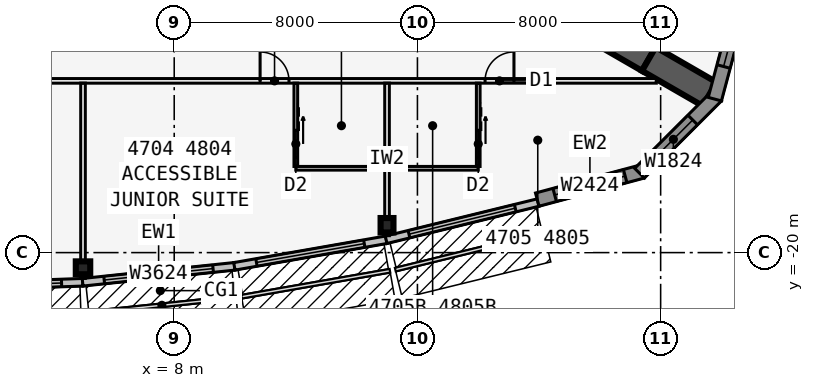
"""IFC4 building model, lengths in metres.
Left out: names, types, materials, properties, quantities, classifications, styles, units other than length and angle.
Written with IfcOpenShell. Run it as: python <this file> out.ifc"""

import sys

from ifc_helpers import new_model, si_unit, direction, frame, frame_2d, origin, origin_2d, place, context, subcontext, project, spatial, polyline, rectangle, i_section, outline, extrude, element, fill, save


model = new_model("IFC4")
c1 = context("Model", 3, precision=1e-05, world=origin(), true_north=direction((0.0, 1.0)))
c2 = subcontext(c1, "Body", "Model", "MODEL_VIEW")
j1 = project(units=[si_unit("LENGTHUNIT", "METRE"), si_unit("PLANEANGLEUNIT", "RADIAN")], contexts=[c1])
p1 = place(None, origin())
s1 = spatial("IfcSite", under=j1, at=p1, CompositionType="ELEMENT")
p2 = place(p1, origin())
s2 = spatial("IfcBuilding", under=s1, at=p2, CompositionType="ELEMENT")
p3 = place(p2, frame((0.0, 0.0, 175.9)))
s3 = spatial("IfcBuildingStorey", under=s2, at=p3, CompositionType="ELEMENT", Elevation=175.9)
for number, where, z_axis, x_axis in (
    (1, (21.61, -12.477, 0.0), (0.0, 0.0, 1.0), (0.866, -0.5, 0.0)),
    (2, (23.61, -13.631, 0.0), (0.0, 0.0, 1.0), (0.866, -0.5, 0.0)),
):
    element("IfcWall", number, at=place(p3, frame(where, z_axis=z_axis, x_axis=x_axis)), inside=s3, PredefinedType="SHEAR", context=c2, shape_type="SweptSolid", body=[
        extrude(rectangle(XDim=2.309, YDim=0.9, at=frame_2d((1.155, 0.0))), origin(), (0.0, 0.0, 1.0), 3.4),
    ])
for number, where, z_axis, x_axis in (
    (3, (5.0, -20.5, 0.0), (0.0, 0.0, 1.0), (0.0, -1.0, 0.0)),
    (4, (15.0, -19.1, 0.0), (0.0, 0.0, 1.0), (1.0, 0.0, 0.0)),
):
    element("IfcColumn", number, at=place(p3, frame(where, z_axis=z_axis, x_axis=x_axis)), inside=s3, PredefinedType="COLUMN", context=c2, shape_type="SweptSolid", body=[
        extrude(i_section(OverallWidth=0.424, OverallDepth=0.475, WebThickness=0.048, FlangeThickness=0.077, at=origin_2d()), origin(), (0.0, 0.0, 1.0), 3.4),
    ])
p4 = place(p3, frame((-0.004, -21.15, 0.0), z_axis=(0.0, 0.0, 1.0), x_axis=(0.999387720943, 0.034988329879, 0.0)))
e5 = element("IfcWall", 5, at=p4, inside=s3, PredefinedType="STANDARD", context=c2, shape_type="SweptSolid", body=[
    extrude(rectangle(XDim=5.003, YDim=0.25, at=frame_2d((2.501, 0.0))), origin(), (0.0, 0.0, 1.0), 3.235),
])
p5 = place(p4, frame((0.701, 0.0, 0.45)))
e6 = element("IfcOpeningElement", 6, at=p5, cuts=e5, PredefinedType="OPENING", context=c2, shape_type="SweptSolid", body=[
    extrude(rectangle(XDim=3.6, YDim=2.4, at=frame_2d((1.8, 1.2))), frame((0.0, 0.135, 0.0), z_axis=(0.0, -1.0, 0.0), x_axis=(1.0, 0.0, 0.0)), (0.0, 0.0, 1.0), 0.27),
])
p6 = place(p3, frame((4.987, -20.976, 0.0), z_axis=(0.0, 0.0, 1.0), x_axis=(0.994534683851, 0.104406717299, 0.0)))
e7 = element("IfcWall", 7, at=p6, inside=s3, PredefinedType="STANDARD", context=c2, shape_type="SweptSolid", body=[
    extrude(rectangle(XDim=5.028, YDim=0.25, at=frame_2d((2.514, 0.0))), origin(), (0.0, 0.0, 1.0), 3.235),
])
p7 = place(p6, frame((0.714, 0.0, 0.45)))
e8 = element("IfcOpeningElement", 8, at=p7, cuts=e7, PredefinedType="OPENING", context=c2, shape_type="SweptSolid", body=[
    extrude(rectangle(XDim=3.6, YDim=2.4, at=frame_2d((1.8, 1.2))), frame((0.0, 0.135, 0.0), z_axis=(0.0, -1.0, 0.0), x_axis=(1.0, 0.0, 0.0)), (0.0, 0.0, 1.0), 0.27),
])
p8 = place(p3, frame((9.979, -20.452, 0.0), z_axis=(0.0, 0.0, 1.0), x_axis=(0.985030467156, 0.172380331752, 0.0)))
e9 = element("IfcWall", 9, at=p8, inside=s3, PredefinedType="STANDARD", context=c2, shape_type="SweptSolid", body=[
    extrude(rectangle(XDim=5.076, YDim=0.25, at=frame_2d((2.538, 0.0))), origin(), (0.0, 0.0, 1.0), 3.235),
])
p9 = place(p8, frame((0.738, 0.0, 0.45)))
e10 = element("IfcOpeningElement", 10, at=p9, cuts=e9, PredefinedType="OPENING", context=c2, shape_type="SweptSolid", body=[
    extrude(rectangle(XDim=3.6, YDim=2.4, at=frame_2d((1.8, 1.2))), frame((0.0, 0.135, 0.0), z_axis=(0.0, -1.0, 0.0), x_axis=(1.0, 0.0, 0.0)), (0.0, 0.0, 1.0), 0.27),
])
p10 = place(p3, frame((14.97, -19.579, 0.0), z_axis=(0.0, 0.0, 1.0), x_axis=(0.971270024053, 0.237980126011, 0.0)))
e11 = element("IfcWall", 11, at=p10, inside=s3, PredefinedType="STANDARD", context=c2, shape_type="SweptSolid", body=[
    extrude(rectangle(XDim=5.148, YDim=0.25, at=frame_2d((2.574, 0.0))), origin(), (0.0, 0.0, 1.0), 3.235),
])
p11 = place(p10, frame((0.774, 0.0, 0.45)))
e12 = element("IfcOpeningElement", 12, at=p11, cuts=e11, PredefinedType="OPENING", context=c2, shape_type="SweptSolid", body=[
    extrude(rectangle(XDim=3.6, YDim=2.4, at=frame_2d((1.8, 1.2))), frame((0.0, 0.135, 0.0), z_axis=(0.0, -1.0, 0.0), x_axis=(1.0, 0.0, 0.0)), (0.0, 0.0, 1.0), 0.27),
])
p12 = place(p3, frame((19.942, -18.258, 0.0), z_axis=(0.0, 0.0, 1.0), x_axis=(0.965924653531, 0.258823421857, 0.0)))
e13 = element("IfcWall", 13, at=p12, inside=s3, PredefinedType="SOLIDWALL", context=c2, shape_type="SweptSolid", body=[
    extrude(rectangle(XDim=3.586, YDim=0.45, at=frame_2d((1.793, 0.0))), origin(), (0.0, 0.0, 1.0), 3.235),
])
p13 = place(p12, frame((0.593, 0.0, 0.45)))
e14 = element("IfcOpeningElement", 14, at=p13, cuts=e13, PredefinedType="OPENING", context=c2, shape_type="SweptSolid", body=[
    extrude(rectangle(XDim=2.4, YDim=2.4, at=frame_2d((1.2, 1.2))), frame((0.0, 0.235, 0.0), z_axis=(0.0, -1.0, 0.0), x_axis=(1.0, 0.0, 0.0)), (0.0, 0.0, 1.0), 0.47),
])
p14 = place(p3, frame((23.305, -17.388, 0.0), z_axis=(0.0, 0.0, 1.0), x_axis=(0.707106781187, 0.707106781187, 0.0)))
e15 = element("IfcWall", 15, at=p14, inside=s3, PredefinedType="SOLIDWALL", context=c2, shape_type="SweptSolid", body=[
    extrude(outline(polyline([(3.586, 0.225), (3.527, 0.225), (3.035, 0.093), (3.0, 0.225), (0.0, 0.225), (0.0, -0.225), (3.586, -0.225), (3.586, 0.225)])), origin(), (0.0, 0.0, 1.0), 3.235),
])
p15 = place(p14, frame((0.675, 0.0, 0.45)))
e16 = element("IfcOpeningElement", 16, at=p15, cuts=e15, PredefinedType="OPENING", context=c2, shape_type="SweptSolid", body=[
    extrude(rectangle(XDim=1.8, YDim=2.4, at=frame_2d((0.9, 1.2))), frame((0.0, 0.235, 0.0), z_axis=(0.0, -1.0, 0.0), x_axis=(1.0, 0.0, 0.0)), (0.0, 0.0, 1.0), 0.47),
])
p16 = place(p3, frame((25.783, -14.953, 0.0), z_axis=(0.0, 0.0, 1.0), x_axis=(0.258823421857, 0.965924653531, 0.0)))
e17 = element("IfcWall", 17, at=p16, inside=s3, PredefinedType="SOLIDWALL", context=c2, shape_type="SweptSolid", body=[
    extrude(outline(polyline([(3.586, 0.225), (0.586, 0.225), (0.551, 0.093), (0.06, 0.225), (0.0, 0.225), (0.0, -0.225), (3.586, -0.225), (3.586, 0.225)])), origin(), (0.0, 0.0, 1.0), 3.235),
])
p17 = place(p16, frame((1.111, 0.0, 0.45)))
e18 = element("IfcOpeningElement", 18, at=p17, cuts=e17, PredefinedType="OPENING", context=c2, shape_type="SweptSolid", body=[
    extrude(rectangle(XDim=1.8, YDim=2.4, at=frame_2d((0.9, 1.2))), frame((0.0, 0.235, 0.0), z_axis=(0.0, -1.0, 0.0), x_axis=(1.0, 0.0, 0.0)), (0.0, 0.0, 1.0), 0.47),
])
p18 = place(p3, frame((-23.857, -14.351, 0.0), z_axis=(0.0, 0.0, 1.0), x_axis=(1.0, 0.0, 0.0)))
e19 = element("IfcWall", 19, at=p18, inside=s3, PredefinedType="PARTITIONING", context=c2, shape_type="SweptSolid", body=[
    extrude(rectangle(XDim=47.714, YDim=0.15, at=frame_2d((23.857, 0.0))), origin(), (0.0, 0.0, 1.0), 3.235),
])
p19 = place(p18, frame((4.682, 0.0, 0.0)))
e20 = element("IfcOpeningElement", 20, at=p19, cuts=e19, PredefinedType="OPENING", context=c2, shape_type="SweptSolid", body=[
    extrude(rectangle(XDim=0.95, YDim=2.13, at=frame_2d((0.475, 1.065))), frame((0.0, 0.085, 0.0), z_axis=(0.0, -1.0, 0.0), x_axis=(1.0, 0.0, 0.0)), (0.0, 0.0, 1.0), 0.17),
])
p20 = place(p18, frame((10.282, 0.0, 0.0)))
e21 = element("IfcOpeningElement", 21, at=p20, cuts=e19, PredefinedType="OPENING", context=c2, shape_type="SweptSolid", body=[
    extrude(rectangle(XDim=0.95, YDim=2.13, at=frame_2d((0.475, 1.065))), frame((0.0, 0.085, 0.0), z_axis=(0.0, -1.0, 0.0), x_axis=(1.0, 0.0, 0.0)), (0.0, 0.0, 1.0), 0.17),
])
p21 = place(p18, frame((17.082, 0.0, 0.0)))
e22 = element("IfcOpeningElement", 22, at=p21, cuts=e19, PredefinedType="OPENING", context=c2, shape_type="SweptSolid", body=[
    extrude(rectangle(XDim=0.95, YDim=2.13, at=frame_2d((0.475, 1.065))), frame((0.0, 0.085, 0.0), z_axis=(0.0, -1.0, 0.0), x_axis=(1.0, 0.0, 0.0)), (0.0, 0.0, 1.0), 0.17),
])
p22 = place(p18, frame((25.857, 0.0, 0.0)))
e23 = element("IfcOpeningElement", 23, at=p22, cuts=e19, PredefinedType="OPENING", context=c2, shape_type="SweptSolid", body=[
    extrude(rectangle(XDim=1.0, YDim=2.13, at=frame_2d((0.5, 1.065))), frame((0.0, 0.085, 0.0), z_axis=(0.0, -1.0, 0.0), x_axis=(1.0, 0.0, 0.0)), (0.0, 0.0, 1.0), 0.17),
])
p23 = place(p18, frame((34.682, 0.0, 0.0)))
e24 = element("IfcOpeningElement", 24, at=p23, cuts=e19, PredefinedType="OPENING", context=c2, shape_type="SweptSolid", body=[
    extrude(rectangle(XDim=0.95, YDim=2.13, at=frame_2d((0.475, 1.065))), frame((0.0, 0.085, 0.0), z_axis=(0.0, -1.0, 0.0), x_axis=(1.0, 0.0, 0.0)), (0.0, 0.0, 1.0), 0.17),
])
p24 = place(p18, frame((42.082, 0.0, 0.0)))
e25 = element("IfcOpeningElement", 25, at=p24, cuts=e19, PredefinedType="OPENING", context=c2, shape_type="SweptSolid", body=[
    extrude(rectangle(XDim=0.95, YDim=2.13, at=frame_2d((0.475, 1.065))), frame((0.0, 0.085, 0.0), z_axis=(0.0, -1.0, 0.0), x_axis=(1.0, 0.0, 0.0)), (0.0, 0.0, 1.0), 0.17),
])
p25 = place(p3, frame((5.0, -14.426, 0.0), z_axis=(0.0, 0.0, 1.0), x_axis=(0.0, -1.0, 0.0)))
e26 = element("IfcWall", 26, at=p25, inside=s3, PredefinedType="PARTITIONING", context=c2, shape_type="SweptSolid", body=[
    extrude(rectangle(XDim=6.423, YDim=0.15, at=frame_2d((3.211, 0.0))), origin(), (0.0, 0.0, 1.0), 2.389),
])
p26 = place(p3, frame((15.0, -14.426, 0.0), z_axis=(0.0, 0.0, 1.0), x_axis=(0.0, -1.0, 0.0)))
e27 = element("IfcWall", 27, at=p26, inside=s3, PredefinedType="PARTITIONING", context=c2, shape_type="SweptSolid", body=[
    extrude(rectangle(XDim=5.017, YDim=0.15, at=frame_2d((2.508, 0.0))), origin(), (0.0, 0.0, 1.0), 2.389),
])
p27 = place(p3, frame((12.0, -17.226, 0.0), z_axis=(0.0, 0.0, 1.0), x_axis=(1.0, 0.0, 0.0)))
e28 = element("IfcWall", 28, at=p27, inside=s3, PredefinedType="PLUMBINGWALL", context=c2, shape_type="SweptSolid", body=[
    extrude(rectangle(XDim=3.0, YDim=0.12, at=frame_2d((1.5, 0.0))), origin(), (0.0, 0.0, 1.0), 3.235),
])
p28 = place(p3, frame((12.0, -14.426, 0.0), z_axis=(0.0, 0.0, 1.0), x_axis=(0.0, -1.0, 0.0)))
e29 = element("IfcWall", 29, at=p28, inside=s3, PredefinedType="PLUMBINGWALL", context=c2, shape_type="SweptSolid", body=[
    extrude(rectangle(XDim=2.74, YDim=0.12, at=frame_2d((1.37, 0.0))), origin(), (0.0, 0.0, 1.0), 3.235),
])
p29 = place(p28, frame((1.55, 0.0, 0.0)))
e30 = element("IfcOpeningElement", 30, at=p29, cuts=e29, PredefinedType="OPENING", context=c2, shape_type="SweptSolid", body=[
    extrude(rectangle(XDim=0.9, YDim=2.13, at=frame_2d((0.45, 1.065))), frame((0.0, 0.07, 0.0), z_axis=(0.0, -1.0, 0.0), x_axis=(1.0, 0.0, 0.0)), (0.0, 0.0, 1.0), 0.14),
])
p30 = place(p3, frame((15.0, -17.226, 0.0), z_axis=(0.0, 0.0, 1.0), x_axis=(1.0, 0.0, 0.0)))
e31 = element("IfcWall", 31, at=p30, inside=s3, PredefinedType="PLUMBINGWALL", context=c2, shape_type="SweptSolid", body=[
    extrude(rectangle(XDim=3.0, YDim=0.12, at=frame_2d((1.5, 0.0))), origin(), (0.0, 0.0, 1.0), 3.235),
])
p31 = place(p3, frame((18.0, -14.426, 0.0), z_axis=(0.0, 0.0, 1.0), x_axis=(0.0, -1.0, 0.0)))
e32 = element("IfcWall", 32, at=p31, inside=s3, PredefinedType="PLUMBINGWALL", context=c2, shape_type="SweptSolid", body=[
    extrude(rectangle(XDim=2.74, YDim=0.12, at=frame_2d((1.37, 0.0))), origin(), (0.0, 0.0, 1.0), 3.235),
])
p32 = place(p31, frame((1.55, 0.0, 0.0)))
e33 = element("IfcOpeningElement", 33, at=p32, cuts=e32, PredefinedType="OPENING", context=c2, shape_type="SweptSolid", body=[
    extrude(rectangle(XDim=0.9, YDim=2.13, at=frame_2d((0.45, 1.065))), frame((0.0, 0.07, 0.0), z_axis=(0.0, -1.0, 0.0), x_axis=(1.0, 0.0, 0.0)), (0.0, 0.0, 1.0), 0.14),
])
p33 = place(p5, origin())
e34 = element("IfcWindow", 34, at=p33, inside=s3, PartitioningType="SINGLE_PANEL", PredefinedType="WINDOW", context=c2, shape_type="SweptSolid", body=[
    extrude(rectangle(XDim=3.6, YDim=2.4, at=frame_2d((1.8, 1.2))), frame((0.0, 0.03, 0.0), z_axis=(0.0, -1.0, 0.0), x_axis=(1.0, 0.0, 0.0)), (0.0, 0.0, 1.0), 0.06),
])
fill(e6, e34)
p34 = place(p7, origin())
e35 = element("IfcWindow", 35, at=p34, inside=s3, PartitioningType="SINGLE_PANEL", PredefinedType="WINDOW", context=c2, shape_type="SweptSolid", body=[
    extrude(rectangle(XDim=3.6, YDim=2.4, at=frame_2d((1.8, 1.2))), frame((0.0, 0.03, 0.0), z_axis=(0.0, -1.0, 0.0), x_axis=(1.0, 0.0, 0.0)), (0.0, 0.0, 1.0), 0.06),
])
fill(e8, e35)
p35 = place(p9, origin())
e36 = element("IfcWindow", 36, at=p35, inside=s3, PartitioningType="SINGLE_PANEL", PredefinedType="WINDOW", context=c2, shape_type="SweptSolid", body=[
    extrude(rectangle(XDim=3.6, YDim=2.4, at=frame_2d((1.8, 1.2))), frame((0.0, 0.03, 0.0), z_axis=(0.0, -1.0, 0.0), x_axis=(1.0, 0.0, 0.0)), (0.0, 0.0, 1.0), 0.06),
])
fill(e10, e36)
p36 = place(p11, origin())
e37 = element("IfcWindow", 37, at=p36, inside=s3, PartitioningType="SINGLE_PANEL", PredefinedType="WINDOW", context=c2, shape_type="SweptSolid", body=[
    extrude(rectangle(XDim=3.6, YDim=2.4, at=frame_2d((1.8, 1.2))), frame((0.0, 0.03, 0.0), z_axis=(0.0, -1.0, 0.0), x_axis=(1.0, 0.0, 0.0)), (0.0, 0.0, 1.0), 0.06),
])
fill(e12, e37)
p37 = place(p13, origin())
e38 = element("IfcWindow", 38, at=p37, inside=s3, PartitioningType="SINGLE_PANEL", PredefinedType="WINDOW", context=c2, shape_type="SweptSolid", body=[
    extrude(rectangle(XDim=2.4, YDim=2.4, at=frame_2d((1.2, 1.2))), frame((0.0, 0.03, 0.0), z_axis=(0.0, -1.0, 0.0), x_axis=(1.0, 0.0, 0.0)), (0.0, 0.0, 1.0), 0.06),
])
fill(e14, e38)
p38 = place(p15, origin())
e39 = element("IfcWindow", 39, at=p38, inside=s3, PartitioningType="SINGLE_PANEL", PredefinedType="WINDOW", context=c2, shape_type="SweptSolid", body=[
    extrude(rectangle(XDim=1.8, YDim=2.4, at=frame_2d((0.9, 1.2))), frame((0.0, 0.03, 0.0), z_axis=(0.0, -1.0, 0.0), x_axis=(1.0, 0.0, 0.0)), (0.0, 0.0, 1.0), 0.06),
])
fill(e16, e39)
p39 = place(p17, origin())
e40 = element("IfcWindow", 40, at=p39, inside=s3, PartitioningType="SINGLE_PANEL", PredefinedType="WINDOW", context=c2, shape_type="SweptSolid", body=[
    extrude(rectangle(XDim=1.8, YDim=2.4, at=frame_2d((0.9, 1.2))), frame((0.0, 0.03, 0.0), z_axis=(0.0, -1.0, 0.0), x_axis=(1.0, 0.0, 0.0)), (0.0, 0.0, 1.0), 0.06),
])
fill(e18, e40)
p40 = place(p29, origin())
e41 = element("IfcDoor", 41, at=p40, inside=s3, OperationType="SLIDING_TO_LEFT", PredefinedType="DOOR", context=c2, shape_type="SweptSolid", body=[
    extrude(rectangle(XDim=0.9, YDim=2.13, at=frame_2d((0.45, 1.065))), frame((0.0, 0.025, 0.0), z_axis=(0.0, -1.0, 0.0), x_axis=(1.0, 0.0, 0.0)), (0.0, 0.0, 1.0), 0.05),
])
fill(e30, e41)
p41 = place(p23, origin())
e42 = element("IfcDoor", 42, at=p41, inside=s3, OperationType="SINGLE_SWING_LEFT", PredefinedType="DOOR", context=c2, shape_type="SweptSolid", body=[
    extrude(rectangle(XDim=0.95, YDim=2.13, at=frame_2d((0.475, 1.065))), frame((0.0, 0.025, 0.0), z_axis=(0.0, -1.0, 0.0), x_axis=(1.0, 0.0, 0.0)), (0.0, 0.0, 1.0), 0.05),
])
fill(e24, e42)
p42 = place(p32, origin())
e43 = element("IfcDoor", 43, at=p42, inside=s3, OperationType="SLIDING_TO_LEFT", PredefinedType="DOOR", context=c2, shape_type="SweptSolid", body=[
    extrude(rectangle(XDim=0.9, YDim=2.13, at=frame_2d((0.45, 1.065))), frame((0.0, 0.025, 0.0), z_axis=(0.0, -1.0, 0.0), x_axis=(1.0, 0.0, 0.0)), (0.0, 0.0, 1.0), 0.05),
])
fill(e33, e43)
p43 = place(p24, origin())
e44 = element("IfcDoor", 44, at=p43, inside=s3, OperationType="SINGLE_SWING_RIGHT", PredefinedType="DOOR", context=c2, shape_type="SweptSolid", body=[
    extrude(rectangle(XDim=0.95, YDim=2.13, at=frame_2d((0.475, 1.065))), frame((0.0, 0.025, 0.0), z_axis=(0.0, -1.0, 0.0), x_axis=(1.0, 0.0, 0.0)), (0.0, 0.0, 1.0), 0.05),
])
fill(e25, e44)
save(model, sys.argv[1])
